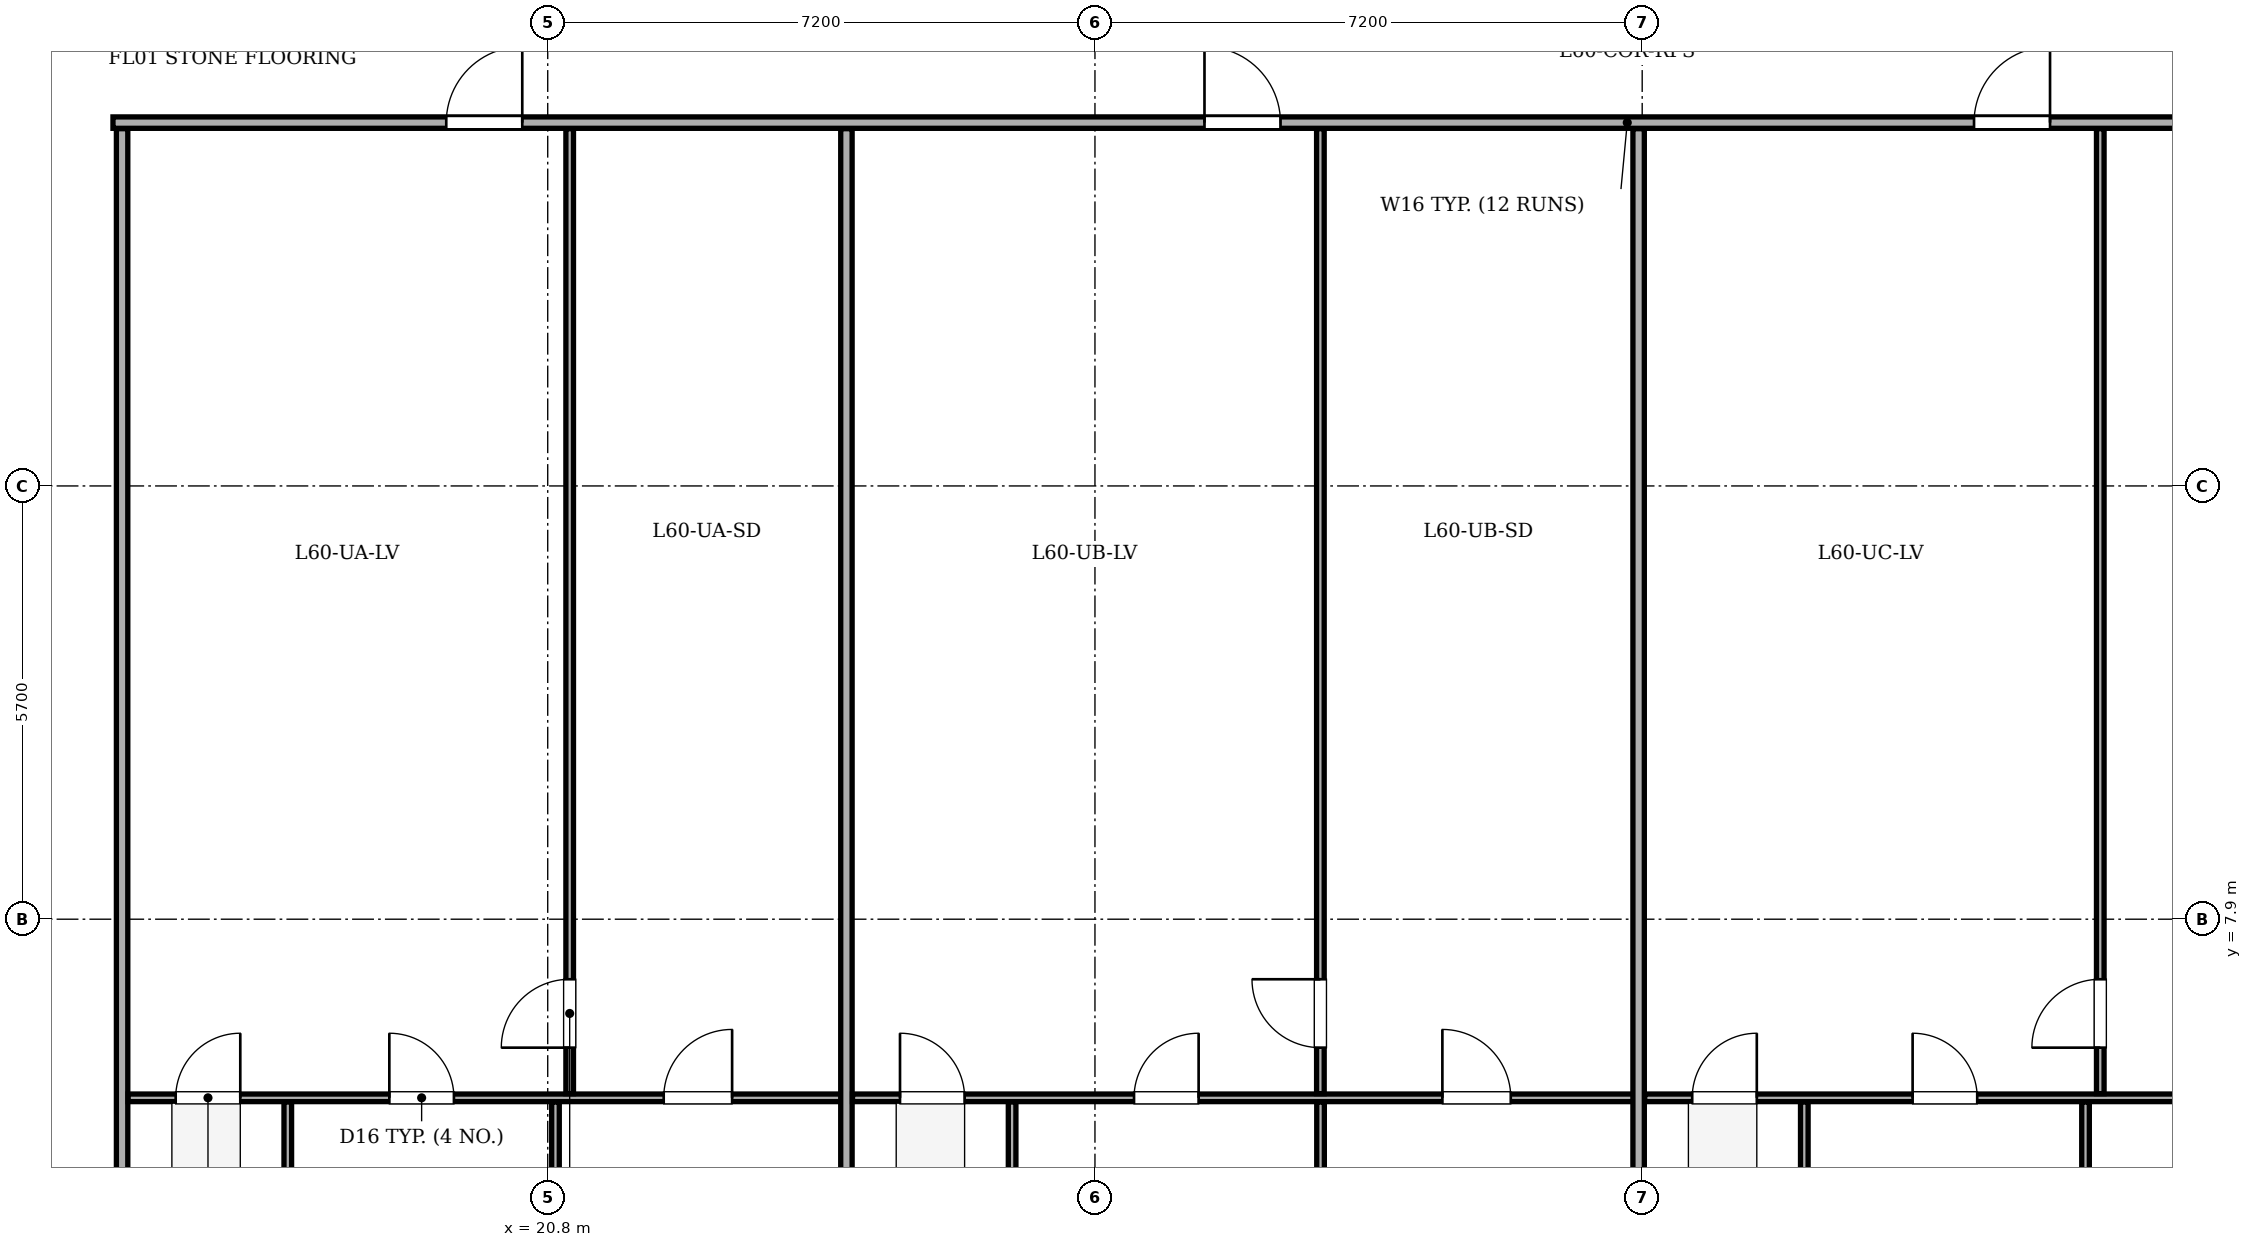
"""IFC4 building model, lengths in metres.
Left out: names, types, materials, properties, quantities, classifications, styles, units other than length and angle.
Written with IfcOpenShell. Run it as: python <this file> out.ifc"""

import sys

from ifc_helpers import new_model, si_unit, direction, frame, frame_2d, origin, place, context, subcontext, project, spatial, rectangle, extrude, element, fill, save


model = new_model("IFC4")
c1 = context("Model", 3, precision=1e-05, world=origin(), true_north=direction((0.0, 1.0)))
c2 = subcontext(c1, "Body", "Model", "MODEL_VIEW")
j1 = project(units=[si_unit("LENGTHUNIT", "METRE"), si_unit("PLANEANGLEUNIT", "RADIAN")], contexts=[c1])
p1 = place(None, origin())
s1 = spatial("IfcSite", under=j1, at=p1, CompositionType="ELEMENT")
p2 = place(p1, origin())
s2 = spatial("IfcBuilding", under=s1, at=p2, CompositionType="ELEMENT")
p3 = place(p2, frame((0.0, 0.0, 231.3)))
s3 = spatial("IfcBuildingStorey", under=s2, at=p3, CompositionType="ELEMENT", Elevation=231.3)
p4 = place(p3, frame((15.2, 2.88, 0.0), z_axis=(0.0, 0.0, 1.0), x_axis=(-0.707106781187, 0.707106781187, 0.0)))
e1 = element("IfcWall", 1, at=p4, inside=s3, PredefinedType="STANDARD", context=c2, shape_type="SweptSolid", body=[
    extrude(rectangle(XDim=6.11, YDim=0.32, at=frame_2d((3.055, 0.0))), origin(), (0.0, 0.0, 1.0), 2.725),
])
p5 = place(p4, frame((2.355, 0.0, 0.75)))
e2 = element("IfcOpeningElement", 2, at=p5, cuts=e1, PredefinedType="OPENING", context=c2, shape_type="SweptSolid", body=[
    extrude(rectangle(XDim=1.4, YDim=1.65, at=frame_2d((0.7, 0.825))), frame((0.0, 0.17, 0.0), z_axis=(0.0, -1.0, 0.0), x_axis=(1.0, 0.0, 0.0)), (0.0, 0.0, 1.0), 0.34),
])
p6 = place(p3, frame((15.08, 18.38, 0.0), z_axis=(0.0, 0.0, 1.0), x_axis=(1.0, 0.0, 0.0)))
e3 = element("IfcWall", 3, at=p6, inside=s3, PredefinedType="PARTITIONING", context=c2, shape_type="SweptSolid", body=[
    extrude(rectangle(XDim=30.02, YDim=0.15, at=frame_2d((15.01, 0.0))), origin(), (0.0, 0.0, 1.0), 3.1),
])
p7 = place(p6, frame((4.385, 0.0, 0.0)))
e4 = element("IfcOpeningElement", 4, at=p7, cuts=e3, PredefinedType="OPENING", context=c2, shape_type="SweptSolid", body=[
    extrude(rectangle(XDim=1.0, YDim=2.1, at=frame_2d((0.5, 1.05))), frame((0.0, 0.085, 0.0), z_axis=(0.0, -1.0, 0.0), x_axis=(1.0, 0.0, 0.0)), (0.0, 0.0, 1.0), 0.17),
])
p8 = place(p6, frame((14.361, 0.0, 0.0)))
e5 = element("IfcOpeningElement", 5, at=p8, cuts=e3, PredefinedType="OPENING", context=c2, shape_type="SweptSolid", body=[
    extrude(rectangle(XDim=1.0, YDim=2.1, at=frame_2d((0.5, 1.05))), frame((0.0, 0.085, 0.0), z_axis=(0.0, -1.0, 0.0), x_axis=(1.0, 0.0, 0.0)), (0.0, 0.0, 1.0), 0.17),
])
p9 = place(p6, frame((24.486, 0.0, 0.0)))
e6 = element("IfcOpeningElement", 6, at=p9, cuts=e3, PredefinedType="OPENING", context=c2, shape_type="SweptSolid", body=[
    extrude(rectangle(XDim=1.0, YDim=2.1, at=frame_2d((0.5, 1.05))), frame((0.0, 0.085, 0.0), z_axis=(0.0, -1.0, 0.0), x_axis=(1.0, 0.0, 0.0)), (0.0, 0.0, 1.0), 0.17),
])
p10 = place(p3, frame((15.2, 3.045, 0.0), z_axis=(0.0, 0.0, 1.0), x_axis=(0.0, 1.0, 0.0)))
e7 = element("IfcWall", 7, at=p10, inside=s3, PredefinedType="PARTITIONING", context=c2, shape_type="SweptSolid", body=[
    extrude(rectangle(XDim=15.255, YDim=0.15, at=frame_2d((7.627, 0.0))), origin(), (0.0, 0.0, 1.0), 3.1),
])
p11 = place(p3, frame((15.28, 5.55, 0.0), z_axis=(0.0, 0.0, 1.0), x_axis=(1.0, 0.0, 0.0)))
e8 = element("IfcWall", 8, at=p11, inside=s3, PredefinedType="PARTITIONING", context=c2, shape_type="SweptSolid", body=[
    extrude(rectangle(XDim=9.49, YDim=0.1, at=frame_2d((4.745, 0.0))), origin(), (0.0, 0.0, 1.0), 3.1),
])
p12 = place(p11, frame((0.625, 0.0, 0.0)))
e9 = element("IfcOpeningElement", 9, at=p12, cuts=e8, PredefinedType="OPENING", context=c2, shape_type="SweptSolid", body=[
    extrude(rectangle(XDim=0.85, YDim=2.05, at=frame_2d((0.425, 1.025))), frame((0.0, 0.06, 0.0), z_axis=(0.0, -1.0, 0.0), x_axis=(1.0, 0.0, 0.0)), (0.0, 0.0, 1.0), 0.12),
])
p13 = place(p11, frame((3.436, 0.0, 0.0)))
e10 = element("IfcOpeningElement", 10, at=p13, cuts=e8, PredefinedType="OPENING", context=c2, shape_type="SweptSolid", body=[
    extrude(rectangle(XDim=0.85, YDim=2.05, at=frame_2d((0.425, 1.025))), frame((0.0, 0.06, 0.0), z_axis=(0.0, -1.0, 0.0), x_axis=(1.0, 0.0, 0.0)), (0.0, 0.0, 1.0), 0.12),
])
p14 = place(p11, frame((7.046, 0.0, 0.0)))
e11 = element("IfcOpeningElement", 11, at=p14, cuts=e8, PredefinedType="OPENING", context=c2, shape_type="SweptSolid", body=[
    extrude(rectangle(XDim=0.9, YDim=2.05, at=frame_2d((0.45, 1.025))), frame((0.0, 0.06, 0.0), z_axis=(0.0, -1.0, 0.0), x_axis=(1.0, 0.0, 0.0)), (0.0, 0.0, 1.0), 0.12),
])
p15 = place(p3, frame((21.089, 5.605, 0.0), z_axis=(0.0, 0.0, 1.0), x_axis=(0.0, 1.0, 0.0)))
e12 = element("IfcWall", 12, at=p15, inside=s3, PredefinedType="PARTITIONING", context=c2, shape_type="SweptSolid", body=[
    extrude(rectangle(XDim=12.695, YDim=0.1, at=frame_2d((6.348, 0.0))), origin(), (0.0, 0.0, 1.0), 2.535),
])
p16 = place(p15, frame((0.605, 0.0, 0.0)))
e13 = element("IfcOpeningElement", 13, at=p16, cuts=e12, PredefinedType="OPENING", context=c2, shape_type="SweptSolid", body=[
    extrude(rectangle(XDim=0.9, YDim=2.05, at=frame_2d((0.45, 1.025))), frame((0.0, 0.06, 0.0), z_axis=(0.0, -1.0, 0.0), x_axis=(1.0, 0.0, 0.0)), (0.0, 0.0, 1.0), 0.12),
])
p17 = place(p3, frame((17.38, 3.045, 0.0), z_axis=(0.0, 0.0, 1.0), x_axis=(0.0, 1.0, 0.0)))
e14 = element("IfcWall", 14, at=p17, inside=s3, PredefinedType="PARTITIONING", context=c2, shape_type="SweptSolid", body=[
    extrude(rectangle(XDim=2.45, YDim=0.1, at=frame_2d((1.225, 0.0))), origin(), (0.0, 0.0, 1.0), 3.1),
])
p18 = place(p3, frame((20.902, 3.045, 0.0), z_axis=(0.0, 0.0, 1.0), x_axis=(0.0, 1.0, 0.0)))
e15 = element("IfcWall", 15, at=p18, inside=s3, PredefinedType="PARTITIONING", context=c2, shape_type="SweptSolid", body=[
    extrude(rectangle(XDim=2.45, YDim=0.1, at=frame_2d((1.225, 0.0))), origin(), (0.0, 0.0, 1.0), 2.535),
])
p19 = place(p3, frame((24.73, 3.045, 0.0), z_axis=(0.0, 0.0, 1.0), x_axis=(0.0, 1.0, 0.0)))
e16 = element("IfcWall", 16, at=p19, inside=s3, PredefinedType="PARTITIONING", context=c2, shape_type="SweptSolid", body=[
    extrude(rectangle(XDim=15.255, YDim=0.15, at=frame_2d((7.627, 0.0))), origin(), (0.0, 0.0, 1.0), 3.1),
])
p20 = place(p3, frame((24.81, 5.55, 0.0), z_axis=(0.0, 0.0, 1.0), x_axis=(1.0, 0.0, 0.0)))
e17 = element("IfcWall", 17, at=p20, inside=s3, PredefinedType="PARTITIONING", context=c2, shape_type="SweptSolid", body=[
    extrude(rectangle(XDim=10.383, YDim=0.1, at=frame_2d((5.191, 0.0))), origin(), (0.0, 0.0, 1.0), 3.1),
])
p21 = place(p20, frame((0.625, 0.0, 0.0)))
e18 = element("IfcOpeningElement", 18, at=p21, cuts=e17, PredefinedType="OPENING", context=c2, shape_type="SweptSolid", body=[
    extrude(rectangle(XDim=0.85, YDim=2.05, at=frame_2d((0.425, 1.025))), frame((0.0, 0.06, 0.0), z_axis=(0.0, -1.0, 0.0), x_axis=(1.0, 0.0, 0.0)), (0.0, 0.0, 1.0), 0.12),
])
p22 = place(p20, frame((3.704, 0.0, 0.0)))
e19 = element("IfcOpeningElement", 19, at=p22, cuts=e17, PredefinedType="OPENING", context=c2, shape_type="SweptSolid", body=[
    extrude(rectangle(XDim=0.85, YDim=2.05, at=frame_2d((0.425, 1.025))), frame((0.0, 0.06, 0.0), z_axis=(0.0, -1.0, 0.0), x_axis=(1.0, 0.0, 0.0)), (0.0, 0.0, 1.0), 0.12),
])
p23 = place(p20, frame((7.761, 0.0, 0.0)))
e20 = element("IfcOpeningElement", 20, at=p23, cuts=e17, PredefinedType="OPENING", context=c2, shape_type="SweptSolid", body=[
    extrude(rectangle(XDim=0.9, YDim=2.05, at=frame_2d((0.45, 1.025))), frame((0.0, 0.06, 0.0), z_axis=(0.0, -1.0, 0.0), x_axis=(1.0, 0.0, 0.0)), (0.0, 0.0, 1.0), 0.12),
])
p24 = place(p3, frame((30.966, 5.605, 0.0), z_axis=(0.0, 0.0, 1.0), x_axis=(0.0, 1.0, 0.0)))
e21 = element("IfcWall", 21, at=p24, inside=s3, PredefinedType="PARTITIONING", context=c2, shape_type="SweptSolid", body=[
    extrude(rectangle(XDim=12.695, YDim=0.1, at=frame_2d((6.348, 0.0))), origin(), (0.0, 0.0, 1.0), 3.1),
])
p25 = place(p24, frame((0.605, 0.0, 0.0)))
e22 = element("IfcOpeningElement", 22, at=p25, cuts=e21, PredefinedType="OPENING", context=c2, shape_type="SweptSolid", body=[
    extrude(rectangle(XDim=0.9, YDim=2.05, at=frame_2d((0.45, 1.025))), frame((0.0, 0.06, 0.0), z_axis=(0.0, -1.0, 0.0), x_axis=(1.0, 0.0, 0.0)), (0.0, 0.0, 1.0), 0.12),
])
for number, where, z_axis, x_axis in (
    (23, (26.91, 3.045, 0.0), (0.0, 0.0, 1.0), (0.0, 1.0, 0.0)),
    (24, (30.968, 3.045, 0.0), (0.0, 0.0, 1.0), (0.0, 1.0, 0.0)),
):
    element("IfcWall", number, at=place(p3, frame(where, z_axis=z_axis, x_axis=x_axis)), inside=s3, PredefinedType="PARTITIONING", context=c2, shape_type="SweptSolid", body=[
        extrude(rectangle(XDim=2.45, YDim=0.1, at=frame_2d((1.225, 0.0))), origin(), (0.0, 0.0, 1.0), 3.1),
    ])
p26 = place(p3, frame((35.153, 3.045, 0.0), z_axis=(0.0, 0.0, 1.0), x_axis=(0.0, 1.0, 0.0)))
e25 = element("IfcWall", 25, at=p26, inside=s3, PredefinedType="PARTITIONING", context=c2, shape_type="SweptSolid", body=[
    extrude(rectangle(XDim=15.255, YDim=0.15, at=frame_2d((7.627, 0.0))), origin(), (0.0, 0.0, 1.0), 2.535),
])
p27 = place(p3, frame((35.233, 5.55, 0.0), z_axis=(0.0, 0.0, 1.0), x_axis=(1.0, 0.0, 0.0)))
e26 = element("IfcWall", 26, at=p27, inside=s3, PredefinedType="PARTITIONING", context=c2, shape_type="SweptSolid", body=[
    extrude(rectangle(XDim=9.787, YDim=0.1, at=frame_2d((4.894, 0.0))), origin(), (0.0, 0.0, 1.0), 3.1),
])
p28 = place(p27, frame((0.625, 0.0, 0.0)))
e27 = element("IfcOpeningElement", 27, at=p28, cuts=e26, PredefinedType="OPENING", context=c2, shape_type="SweptSolid", body=[
    extrude(rectangle(XDim=0.85, YDim=2.05, at=frame_2d((0.425, 1.025))), frame((0.0, 0.06, 0.0), z_axis=(0.0, -1.0, 0.0), x_axis=(1.0, 0.0, 0.0)), (0.0, 0.0, 1.0), 0.12),
])
p29 = place(p27, frame((3.525, 0.0, 0.0)))
e28 = element("IfcOpeningElement", 28, at=p29, cuts=e26, PredefinedType="OPENING", context=c2, shape_type="SweptSolid", body=[
    extrude(rectangle(XDim=0.85, YDim=2.05, at=frame_2d((0.425, 1.025))), frame((0.0, 0.06, 0.0), z_axis=(0.0, -1.0, 0.0), x_axis=(1.0, 0.0, 0.0)), (0.0, 0.0, 1.0), 0.12),
])
p30 = place(p27, frame((7.284, 0.0, 0.0)))
e29 = element("IfcOpeningElement", 29, at=p30, cuts=e26, PredefinedType="OPENING", context=c2, shape_type="SweptSolid", body=[
    extrude(rectangle(XDim=0.9, YDim=2.05, at=frame_2d((0.45, 1.025))), frame((0.0, 0.06, 0.0), z_axis=(0.0, -1.0, 0.0), x_axis=(1.0, 0.0, 0.0)), (0.0, 0.0, 1.0), 0.12),
])
p31 = place(p3, frame((41.227, 5.605, 0.0), z_axis=(0.0, 0.0, 1.0), x_axis=(0.0, 1.0, 0.0)))
e30 = element("IfcWall", 30, at=p31, inside=s3, PredefinedType="PARTITIONING", context=c2, shape_type="SweptSolid", body=[
    extrude(rectangle(XDim=12.695, YDim=0.1, at=frame_2d((6.348, 0.0))), origin(), (0.0, 0.0, 1.0), 3.1),
])
p32 = place(p31, frame((0.605, 0.0, 0.0)))
e31 = element("IfcOpeningElement", 31, at=p32, cuts=e30, PredefinedType="OPENING", context=c2, shape_type="SweptSolid", body=[
    extrude(rectangle(XDim=0.9, YDim=2.05, at=frame_2d((0.45, 1.025))), frame((0.0, 0.06, 0.0), z_axis=(0.0, -1.0, 0.0), x_axis=(1.0, 0.0, 0.0)), (0.0, 0.0, 1.0), 0.12),
])
for number, where, z_axis, x_axis in (
    (32, (37.333, 3.045, 0.0), (0.0, 0.0, 1.0), (0.0, 1.0, 0.0)),
    (33, (41.033, 3.045, 0.0), (0.0, 0.0, 1.0), (0.0, 1.0, 0.0)),
):
    element("IfcWall", number, at=place(p3, frame(where, z_axis=z_axis, x_axis=x_axis)), inside=s3, PredefinedType="PARTITIONING", context=c2, shape_type="SweptSolid", body=[
        extrude(rectangle(XDim=2.45, YDim=0.1, at=frame_2d((1.225, 0.0))), origin(), (0.0, 0.0, 1.0), 3.1),
    ])
p33 = place(p7, origin())
e34 = element("IfcDoor", 34, at=p33, inside=s3, OperationType="SINGLE_SWING_RIGHT", PredefinedType="DOOR", context=c2, shape_type="SweptSolid", body=[
    extrude(rectangle(XDim=1.0, YDim=2.1, at=frame_2d((0.5, 1.05))), frame((0.0, 0.025, 0.0), z_axis=(0.0, -1.0, 0.0), x_axis=(1.0, 0.0, 0.0)), (0.0, 0.0, 1.0), 0.05),
])
fill(e4, e34)
p34 = place(p8, origin())
e35 = element("IfcDoor", 35, at=p34, inside=s3, OperationType="SINGLE_SWING_LEFT", PredefinedType="DOOR", context=c2, shape_type="SweptSolid", body=[
    extrude(rectangle(XDim=1.0, YDim=2.1, at=frame_2d((0.5, 1.05))), frame((0.0, 0.025, 0.0), z_axis=(0.0, -1.0, 0.0), x_axis=(1.0, 0.0, 0.0)), (0.0, 0.0, 1.0), 0.05),
])
fill(e5, e35)
p35 = place(p9, origin())
e36 = element("IfcDoor", 36, at=p35, inside=s3, OperationType="SINGLE_SWING_RIGHT", PredefinedType="DOOR", context=c2, shape_type="SweptSolid", body=[
    extrude(rectangle(XDim=1.0, YDim=2.1, at=frame_2d((0.5, 1.05))), frame((0.0, 0.025, 0.0), z_axis=(0.0, -1.0, 0.0), x_axis=(1.0, 0.0, 0.0)), (0.0, 0.0, 1.0), 0.05),
])
fill(e6, e36)
p36 = place(p16, origin())
e37 = element("IfcDoor", 37, at=p36, inside=s3, OperationType="SINGLE_SWING_LEFT", PredefinedType="DOOR", context=c2, shape_type="SweptSolid", body=[
    extrude(rectangle(XDim=0.9, YDim=2.05, at=frame_2d((0.45, 1.025))), frame((0.0, 0.025, 0.0), z_axis=(0.0, -1.0, 0.0), x_axis=(1.0, 0.0, 0.0)), (0.0, 0.0, 1.0), 0.05),
])
fill(e13, e37)
p37 = place(p12, origin())
e38 = element("IfcDoor", 38, at=p37, inside=s3, OperationType="SINGLE_SWING_RIGHT", PredefinedType="DOOR", context=c2, shape_type="SweptSolid", body=[
    extrude(rectangle(XDim=0.85, YDim=2.05, at=frame_2d((0.425, 1.025))), frame((0.0, 0.025, 0.0), z_axis=(0.0, -1.0, 0.0), x_axis=(1.0, 0.0, 0.0)), (0.0, 0.0, 1.0), 0.05),
])
fill(e9, e38)
p38 = place(p13, origin())
e39 = element("IfcDoor", 39, at=p38, inside=s3, OperationType="SINGLE_SWING_LEFT", PredefinedType="DOOR", context=c2, shape_type="SweptSolid", body=[
    extrude(rectangle(XDim=0.85, YDim=2.05, at=frame_2d((0.425, 1.025))), frame((0.0, 0.025, 0.0), z_axis=(0.0, -1.0, 0.0), x_axis=(1.0, 0.0, 0.0)), (0.0, 0.0, 1.0), 0.05),
])
fill(e10, e39)
p39 = place(p14, origin())
e40 = element("IfcDoor", 40, at=p39, inside=s3, OperationType="SINGLE_SWING_RIGHT", PredefinedType="DOOR", context=c2, shape_type="SweptSolid", body=[
    extrude(rectangle(XDim=0.9, YDim=2.05, at=frame_2d((0.45, 1.025))), frame((0.0, 0.025, 0.0), z_axis=(0.0, -1.0, 0.0), x_axis=(1.0, 0.0, 0.0)), (0.0, 0.0, 1.0), 0.05),
])
fill(e11, e40)
p40 = place(p25, origin())
e41 = element("IfcDoor", 41, at=p40, inside=s3, OperationType="SINGLE_SWING_RIGHT", PredefinedType="DOOR", context=c2, shape_type="SweptSolid", body=[
    extrude(rectangle(XDim=0.9, YDim=2.05, at=frame_2d((0.45, 1.025))), frame((0.0, 0.025, 0.0), z_axis=(0.0, -1.0, 0.0), x_axis=(1.0, 0.0, 0.0)), (0.0, 0.0, 1.0), 0.05),
])
fill(e22, e41)
p41 = place(p21, origin())
e42 = element("IfcDoor", 42, at=p41, inside=s3, OperationType="SINGLE_SWING_LEFT", PredefinedType="DOOR", context=c2, shape_type="SweptSolid", body=[
    extrude(rectangle(XDim=0.85, YDim=2.05, at=frame_2d((0.425, 1.025))), frame((0.0, 0.025, 0.0), z_axis=(0.0, -1.0, 0.0), x_axis=(1.0, 0.0, 0.0)), (0.0, 0.0, 1.0), 0.05),
])
fill(e18, e42)
p42 = place(p22, origin())
e43 = element("IfcDoor", 43, at=p42, inside=s3, OperationType="SINGLE_SWING_RIGHT", PredefinedType="DOOR", context=c2, shape_type="SweptSolid", body=[
    extrude(rectangle(XDim=0.85, YDim=2.05, at=frame_2d((0.425, 1.025))), frame((0.0, 0.025, 0.0), z_axis=(0.0, -1.0, 0.0), x_axis=(1.0, 0.0, 0.0)), (0.0, 0.0, 1.0), 0.05),
])
fill(e19, e43)
p43 = place(p23, origin())
e44 = element("IfcDoor", 44, at=p43, inside=s3, OperationType="SINGLE_SWING_LEFT", PredefinedType="DOOR", context=c2, shape_type="SweptSolid", body=[
    extrude(rectangle(XDim=0.9, YDim=2.05, at=frame_2d((0.45, 1.025))), frame((0.0, 0.025, 0.0), z_axis=(0.0, -1.0, 0.0), x_axis=(1.0, 0.0, 0.0)), (0.0, 0.0, 1.0), 0.05),
])
fill(e20, e44)
p44 = place(p32, origin())
e45 = element("IfcDoor", 45, at=p44, inside=s3, OperationType="SINGLE_SWING_LEFT", PredefinedType="DOOR", context=c2, shape_type="SweptSolid", body=[
    extrude(rectangle(XDim=0.9, YDim=2.05, at=frame_2d((0.45, 1.025))), frame((0.0, 0.025, 0.0), z_axis=(0.0, -1.0, 0.0), x_axis=(1.0, 0.0, 0.0)), (0.0, 0.0, 1.0), 0.05),
])
fill(e31, e45)
p45 = place(p28, origin())
e46 = element("IfcDoor", 46, at=p45, inside=s3, OperationType="SINGLE_SWING_RIGHT", PredefinedType="DOOR", context=c2, shape_type="SweptSolid", body=[
    extrude(rectangle(XDim=0.85, YDim=2.05, at=frame_2d((0.425, 1.025))), frame((0.0, 0.025, 0.0), z_axis=(0.0, -1.0, 0.0), x_axis=(1.0, 0.0, 0.0)), (0.0, 0.0, 1.0), 0.05),
])
fill(e27, e46)
p46 = place(p29, origin())
e47 = element("IfcDoor", 47, at=p46, inside=s3, OperationType="SINGLE_SWING_LEFT", PredefinedType="DOOR", context=c2, shape_type="SweptSolid", body=[
    extrude(rectangle(XDim=0.85, YDim=2.05, at=frame_2d((0.425, 1.025))), frame((0.0, 0.025, 0.0), z_axis=(0.0, -1.0, 0.0), x_axis=(1.0, 0.0, 0.0)), (0.0, 0.0, 1.0), 0.05),
])
fill(e28, e47)
save(model, sys.argv[1])
